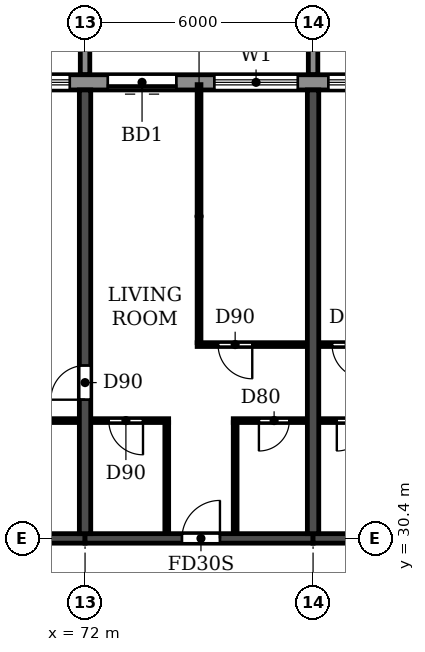
"""IFC4 building model, lengths in metres.
Left out: names, types, materials, properties, quantities, classifications, styles, units other than length and angle.
Written with IfcOpenShell. Run it as: python <this file> out.ifc"""

import sys

from ifc_helpers import new_model, si_unit, direction, frame, frame_2d, origin, place, context, subcontext, project, spatial, polyline, rectangle, outline, extrude, source, transform, mapped, element, fill, save


model = new_model("IFC4")
c1 = context("Model", 3, precision=1e-05, world=origin(), true_north=direction((0.0, 1.0)))
c2 = subcontext(c1, "Body", "Model", "MODEL_VIEW")
j1 = project(units=[si_unit("LENGTHUNIT", "METRE"), si_unit("PLANEANGLEUNIT", "RADIAN")], contexts=[c1])
p1 = place(None, origin())
s1 = spatial("IfcSite", under=j1, at=p1, CompositionType="ELEMENT")
p2 = place(p1, origin())
s2 = spatial("IfcBuilding", under=s1, at=p2, CompositionType="ELEMENT")
p3 = place(p2, frame((0.0, 0.0, 152.1)))
s3 = spatial("IfcBuildingStorey", under=s2, at=p3, CompositionType="ELEMENT", Elevation=152.1)
p4 = place(p3, frame((72.0, 30.525, 0.0), z_axis=(0.0, 0.0, 1.0), x_axis=(0.0, 1.0, 0.0)))
e1 = element("IfcWall", 1, at=p4, inside=s3, PredefinedType="SHEAR", context=c2, shape_type="SweptSolid", body=[
    extrude(rectangle(XDim=11.675, YDim=0.3, at=frame_2d((5.837, 0.0))), origin(), (0.0, 0.0, 1.0), 3.07),
])
p5 = place(p4, frame((3.525, 0.0, 0.0)))
e2 = element("IfcOpeningElement", 2, at=p5, cuts=e1, PredefinedType="OPENING", context=c2, shape_type="SweptSolid", body=[
    extrude(rectangle(XDim=0.9, YDim=2.1, at=frame_2d((0.45, 1.05))), frame((0.0, 0.16, 0.0), z_axis=(0.0, -1.0, 0.0), x_axis=(1.0, 0.0, 0.0)), (0.0, 0.0, 1.0), 0.32),
])
p6 = place(p3, frame((78.0, 30.525, 0.0), z_axis=(0.0, 0.0, 1.0), x_axis=(0.0, 1.0, 0.0)))
e3 = element("IfcWall", 3, at=p6, inside=s3, PredefinedType="SHEAR", context=c2, shape_type="SweptSolid", body=[
    extrude(rectangle(XDim=11.675, YDim=0.3, at=frame_2d((5.837, 0.0))), origin(), (0.0, 0.0, 1.0), 3.07),
])
p7 = place(p3, frame((66.0, 30.4, 0.0), z_axis=(0.0, 0.0, 1.0), x_axis=(1.0, 0.0, 0.0)))
e4 = element("IfcWall", 4, at=p7, inside=s3, PredefinedType="SHEAR", context=c2, shape_type="SweptSolid", body=[
    extrude(rectangle(XDim=6.0, YDim=0.25, at=frame_2d((3.0, 0.0))), origin(), (0.0, 0.0, 1.0), 2.47),
])
p8 = place(p3, frame((72.0, 30.4, 0.0), z_axis=(0.0, 0.0, 1.0), x_axis=(1.0, 0.0, 0.0)))
e5 = element("IfcWall", 5, at=p8, inside=s3, PredefinedType="SHEAR", context=c2, shape_type="SweptSolid", body=[
    extrude(rectangle(XDim=6.0, YDim=0.25, at=frame_2d((3.0, 0.0))), origin(), (0.0, 0.0, 1.0), 2.47),
])
p9 = place(p8, frame((2.55, 0.0, 0.0)))
e6 = element("IfcOpeningElement", 6, at=p9, cuts=e5, PredefinedType="OPENING", context=c2, shape_type="SweptSolid", body=[
    extrude(rectangle(XDim=1.0, YDim=2.1, at=frame_2d((0.5, 1.05))), frame((0.0, 0.135, 0.0), z_axis=(0.0, -1.0, 0.0), x_axis=(1.0, 0.0, 0.0)), (0.0, 0.0, 1.0), 0.27),
])
p10 = place(p3, frame((78.0, 30.4, 0.0), z_axis=(0.0, 0.0, 1.0), x_axis=(1.0, 0.0, 0.0)))
e7 = element("IfcWall", 7, at=p10, inside=s3, PredefinedType="SHEAR", context=c2, shape_type="SweptSolid", body=[
    extrude(rectangle(XDim=6.0, YDim=0.25, at=frame_2d((3.0, 0.0))), origin(), (0.0, 0.0, 1.0), 2.47),
])
p11 = place(p10, frame((2.45, 0.0, 0.0)))
e8 = element("IfcOpeningElement", 8, at=p11, cuts=e7, PredefinedType="OPENING", context=c2, shape_type="SweptSolid", body=[
    extrude(rectangle(XDim=1.0, YDim=2.1, at=frame_2d((0.5, 1.05))), frame((0.0, 0.135, 0.0), z_axis=(0.0, -1.0, 0.0), x_axis=(1.0, 0.0, 0.0)), (0.0, 0.0, 1.0), 0.27),
])
p12 = place(p3, frame((85.317, 42.4, 0.0), z_axis=(0.0, 0.0, 1.0), x_axis=(-1.0, 0.0, 0.0)))
e9 = element("IfcWall", 9, at=p12, inside=s3, PredefinedType="STANDARD", context=c2, shape_type="SweptSolid", body=[
    extrude(rectangle(XDim=68.634, YDim=0.4, at=frame_2d((34.317, 0.0))), origin(), (0.0, 0.0, 1.0), 3.07),
])
p13 = place(p12, frame((64.917, 0.0, 0.0)))
e10 = element("IfcOpeningElement", 10, at=p13, cuts=e9, PredefinedType="OPENING", context=c2, shape_type="SweptSolid", body=[
    extrude(rectangle(XDim=1.8, YDim=2.4, at=frame_2d((0.9, 1.2))), frame((0.0, 0.21, 0.0), z_axis=(0.0, -1.0, 0.0), x_axis=(1.0, 0.0, 0.0)), (0.0, 0.0, 1.0), 0.42),
])
p14 = place(p12, frame((61.717, 0.0, 0.9)))
e11 = element("IfcOpeningElement", 11, at=p14, cuts=e9, PredefinedType="OPENING", context=c2, shape_type="SweptSolid", body=[
    extrude(rectangle(XDim=2.2, YDim=1.5, at=frame_2d((1.1, 0.75))), frame((0.0, 0.21, 0.0), z_axis=(0.0, -1.0, 0.0), x_axis=(1.0, 0.0, 0.0)), (0.0, 0.0, 1.0), 0.42),
])
p15 = place(p12, frame((58.717, 0.0, 0.9)))
e12 = element("IfcOpeningElement", 12, at=p15, cuts=e9, PredefinedType="OPENING", context=c2, shape_type="SweptSolid", body=[
    extrude(rectangle(XDim=2.2, YDim=1.5, at=frame_2d((1.1, 0.75))), frame((0.0, 0.21, 0.0), z_axis=(0.0, -1.0, 0.0), x_axis=(1.0, 0.0, 0.0)), (0.0, 0.0, 1.0), 0.42),
])
p16 = place(p12, frame((55.917, 0.0, 0.0)))
e13 = element("IfcOpeningElement", 13, at=p16, cuts=e9, PredefinedType="OPENING", context=c2, shape_type="SweptSolid", body=[
    extrude(rectangle(XDim=1.8, YDim=2.4, at=frame_2d((0.9, 1.2))), frame((0.0, 0.21, 0.0), z_axis=(0.0, -1.0, 0.0), x_axis=(1.0, 0.0, 0.0)), (0.0, 0.0, 1.0), 0.42),
])
p17 = place(p12, frame((52.917, 0.0, 0.0)))
e14 = element("IfcOpeningElement", 14, at=p17, cuts=e9, PredefinedType="OPENING", context=c2, shape_type="SweptSolid", body=[
    extrude(rectangle(XDim=1.8, YDim=2.4, at=frame_2d((0.9, 1.2))), frame((0.0, 0.21, 0.0), z_axis=(0.0, -1.0, 0.0), x_axis=(1.0, 0.0, 0.0)), (0.0, 0.0, 1.0), 0.42),
])
p18 = place(p12, frame((49.717, 0.0, 0.9)))
e15 = element("IfcOpeningElement", 15, at=p18, cuts=e9, PredefinedType="OPENING", context=c2, shape_type="SweptSolid", body=[
    extrude(rectangle(XDim=2.2, YDim=1.5, at=frame_2d((1.1, 0.75))), frame((0.0, 0.21, 0.0), z_axis=(0.0, -1.0, 0.0), x_axis=(1.0, 0.0, 0.0)), (0.0, 0.0, 1.0), 0.42),
])
p19 = place(p12, frame((46.717, 0.0, 0.9)))
e16 = element("IfcOpeningElement", 16, at=p19, cuts=e9, PredefinedType="OPENING", context=c2, shape_type="SweptSolid", body=[
    extrude(rectangle(XDim=2.2, YDim=1.5, at=frame_2d((1.1, 0.75))), frame((0.0, 0.21, 0.0), z_axis=(0.0, -1.0, 0.0), x_axis=(1.0, 0.0, 0.0)), (0.0, 0.0, 1.0), 0.42),
])
p20 = place(p12, frame((43.717, 0.0, 0.9)))
e17 = element("IfcOpeningElement", 17, at=p20, cuts=e9, PredefinedType="OPENING", context=c2, shape_type="SweptSolid", body=[
    extrude(rectangle(XDim=2.2, YDim=1.5, at=frame_2d((1.1, 0.75))), frame((0.0, 0.21, 0.0), z_axis=(0.0, -1.0, 0.0), x_axis=(1.0, 0.0, 0.0)), (0.0, 0.0, 1.0), 0.42),
])
p21 = place(p12, frame((40.917, 0.0, 0.0)))
e18 = element("IfcOpeningElement", 18, at=p21, cuts=e9, PredefinedType="OPENING", context=c2, shape_type="SweptSolid", body=[
    extrude(rectangle(XDim=1.8, YDim=2.4, at=frame_2d((0.9, 1.2))), frame((0.0, 0.21, 0.0), z_axis=(0.0, -1.0, 0.0), x_axis=(1.0, 0.0, 0.0)), (0.0, 0.0, 1.0), 0.42),
])
p22 = place(p12, frame((37.717, 0.0, 0.9)))
e19 = element("IfcOpeningElement", 19, at=p22, cuts=e9, PredefinedType="OPENING", context=c2, shape_type="SweptSolid", body=[
    extrude(rectangle(XDim=2.2, YDim=1.5, at=frame_2d((1.1, 0.75))), frame((0.0, 0.21, 0.0), z_axis=(0.0, -1.0, 0.0), x_axis=(1.0, 0.0, 0.0)), (0.0, 0.0, 1.0), 0.42),
])
p23 = place(p12, frame((34.917, 0.0, 0.0)))
e20 = element("IfcOpeningElement", 20, at=p23, cuts=e9, PredefinedType="OPENING", context=c2, shape_type="SweptSolid", body=[
    extrude(rectangle(XDim=1.8, YDim=2.4, at=frame_2d((0.9, 1.2))), frame((0.0, 0.21, 0.0), z_axis=(0.0, -1.0, 0.0), x_axis=(1.0, 0.0, 0.0)), (0.0, 0.0, 1.0), 0.42),
])
p24 = place(p12, frame((31.717, 0.0, 0.9)))
e21 = element("IfcOpeningElement", 21, at=p24, cuts=e9, PredefinedType="OPENING", context=c2, shape_type="SweptSolid", body=[
    extrude(rectangle(XDim=2.2, YDim=1.5, at=frame_2d((1.1, 0.75))), frame((0.0, 0.21, 0.0), z_axis=(0.0, -1.0, 0.0), x_axis=(1.0, 0.0, 0.0)), (0.0, 0.0, 1.0), 0.42),
])
p25 = place(p12, frame((28.717, 0.0, 0.9)))
e22 = element("IfcOpeningElement", 22, at=p25, cuts=e9, PredefinedType="OPENING", context=c2, shape_type="SweptSolid", body=[
    extrude(rectangle(XDim=2.2, YDim=1.5, at=frame_2d((1.1, 0.75))), frame((0.0, 0.21, 0.0), z_axis=(0.0, -1.0, 0.0), x_axis=(1.0, 0.0, 0.0)), (0.0, 0.0, 1.0), 0.42),
])
p26 = place(p12, frame((25.717, 0.0, 0.9)))
e23 = element("IfcOpeningElement", 23, at=p26, cuts=e9, PredefinedType="OPENING", context=c2, shape_type="SweptSolid", body=[
    extrude(rectangle(XDim=2.2, YDim=1.5, at=frame_2d((1.1, 0.75))), frame((0.0, 0.21, 0.0), z_axis=(0.0, -1.0, 0.0), x_axis=(1.0, 0.0, 0.0)), (0.0, 0.0, 1.0), 0.42),
])
p27 = place(p12, frame((22.717, 0.0, 0.9)))
e24 = element("IfcOpeningElement", 24, at=p27, cuts=e9, PredefinedType="OPENING", context=c2, shape_type="SweptSolid", body=[
    extrude(rectangle(XDim=2.2, YDim=1.5, at=frame_2d((1.1, 0.75))), frame((0.0, 0.21, 0.0), z_axis=(0.0, -1.0, 0.0), x_axis=(1.0, 0.0, 0.0)), (0.0, 0.0, 1.0), 0.42),
])
p28 = place(p12, frame((19.917, 0.0, 0.0)))
e25 = element("IfcOpeningElement", 25, at=p28, cuts=e9, PredefinedType="OPENING", context=c2, shape_type="SweptSolid", body=[
    extrude(rectangle(XDim=1.8, YDim=2.4, at=frame_2d((0.9, 1.2))), frame((0.0, 0.21, 0.0), z_axis=(0.0, -1.0, 0.0), x_axis=(1.0, 0.0, 0.0)), (0.0, 0.0, 1.0), 0.42),
])
p29 = place(p12, frame((16.717, 0.0, 0.9)))
e26 = element("IfcOpeningElement", 26, at=p29, cuts=e9, PredefinedType="OPENING", context=c2, shape_type="SweptSolid", body=[
    extrude(rectangle(XDim=2.2, YDim=1.5, at=frame_2d((1.1, 0.75))), frame((0.0, 0.21, 0.0), z_axis=(0.0, -1.0, 0.0), x_axis=(1.0, 0.0, 0.0)), (0.0, 0.0, 1.0), 0.42),
])
p30 = place(p12, frame((13.717, 0.0, 0.9)))
e27 = element("IfcOpeningElement", 27, at=p30, cuts=e9, PredefinedType="OPENING", context=c2, shape_type="SweptSolid", body=[
    extrude(rectangle(XDim=2.2, YDim=1.5, at=frame_2d((1.1, 0.75))), frame((0.0, 0.21, 0.0), z_axis=(0.0, -1.0, 0.0), x_axis=(1.0, 0.0, 0.0)), (0.0, 0.0, 1.0), 0.42),
])
p31 = place(p12, frame((10.917, 0.0, 0.0)))
e28 = element("IfcOpeningElement", 28, at=p31, cuts=e9, PredefinedType="OPENING", context=c2, shape_type="SweptSolid", body=[
    extrude(rectangle(XDim=1.8, YDim=2.4, at=frame_2d((0.9, 1.2))), frame((0.0, 0.21, 0.0), z_axis=(0.0, -1.0, 0.0), x_axis=(1.0, 0.0, 0.0)), (0.0, 0.0, 1.0), 0.42),
])
p32 = place(p12, frame((7.717, 0.0, 0.9)))
e29 = element("IfcOpeningElement", 29, at=p32, cuts=e9, PredefinedType="OPENING", context=c2, shape_type="SweptSolid", body=[
    extrude(rectangle(XDim=2.2, YDim=1.5, at=frame_2d((1.1, 0.75))), frame((0.0, 0.21, 0.0), z_axis=(0.0, -1.0, 0.0), x_axis=(1.0, 0.0, 0.0)), (0.0, 0.0, 1.0), 0.42),
])
p33 = place(p12, frame((4.717, 0.0, 0.9)))
e30 = element("IfcOpeningElement", 30, at=p33, cuts=e9, PredefinedType="OPENING", context=c2, shape_type="SweptSolid", body=[
    extrude(rectangle(XDim=2.2, YDim=1.5, at=frame_2d((1.1, 0.75))), frame((0.0, 0.21, 0.0), z_axis=(0.0, -1.0, 0.0), x_axis=(1.0, 0.0, 0.0)), (0.0, 0.0, 1.0), 0.42),
])
p34 = place(p12, frame((1.917, 0.0, 0.0)))
e31 = element("IfcOpeningElement", 31, at=p34, cuts=e9, PredefinedType="OPENING", context=c2, shape_type="SweptSolid", body=[
    extrude(rectangle(XDim=1.8, YDim=2.4, at=frame_2d((0.9, 1.2))), frame((0.0, 0.21, 0.0), z_axis=(0.0, -1.0, 0.0), x_axis=(1.0, 0.0, 0.0)), (0.0, 0.0, 1.0), 0.42),
])
m1 = source(origin(), c2, "Body", "SweptSolid", [
    extrude(outline(polyline([(0.0, 0.0), (0.25, 0.0), (0.25, 3.1), (0.0, 3.1), (0.0, 0.0)])), origin(), (0.0, 0.0, 1.0), 3.1),
])
for number, where in (
    (32, (71.875, 42.6, 0.0)),
    (33, (77.875, 42.6, 0.0)),
):
    element("IfcWall", number, at=place(p3, frame(where)), inside=s3, PredefinedType="STANDARD", context=c2, shape_type="MappedRepresentation", body=[
        mapped(m1, transform((0.0, 0.0, 0.0))),
    ])
p35 = place(p3, frame((68.9, 33.5, 0.0), z_axis=(0.0, 0.0, 1.0), x_axis=(1.0, 0.0, 0.0)))
e34 = element("IfcWall", 34, at=p35, inside=s3, PredefinedType="PARTITIONING", context=c2, shape_type="SweptSolid", body=[
    extrude(rectangle(XDim=2.94, YDim=0.1, at=frame_2d((1.47, 0.0))), origin(), (0.0, 0.0, 1.0), 3.07),
])
p36 = place(p35, frame((1.2, 0.0, 0.0)))
e35 = element("IfcOpeningElement", 35, at=p36, cuts=e34, PredefinedType="OPENING", context=c2, shape_type="SweptSolid", body=[
    extrude(rectangle(XDim=0.8, YDim=2.1, at=frame_2d((0.4, 1.05))), frame((0.0, 0.06, 0.0), z_axis=(0.0, -1.0, 0.0), x_axis=(1.0, 0.0, 0.0)), (0.0, 0.0, 1.0), 0.12),
])
p37 = place(p3, frame((72.16, 33.5, 0.0), z_axis=(0.0, 0.0, 1.0), x_axis=(1.0, 0.0, 0.0)))
e36 = element("IfcWall", 36, at=p37, inside=s3, PredefinedType="PARTITIONING", context=c2, shape_type="SweptSolid", body=[
    extrude(rectangle(XDim=2.04, YDim=0.1, at=frame_2d((1.02, 0.0))), origin(), (0.0, 0.0, 1.0), 3.07),
])
p38 = place(p37, frame((0.465, 0.0, 0.0)))
e37 = element("IfcOpeningElement", 37, at=p38, cuts=e36, PredefinedType="OPENING", context=c2, shape_type="SweptSolid", body=[
    extrude(rectangle(XDim=0.9, YDim=2.1, at=frame_2d((0.45, 1.05))), frame((0.0, 0.06, 0.0), z_axis=(0.0, -1.0, 0.0), x_axis=(1.0, 0.0, 0.0)), (0.0, 0.0, 1.0), 0.12),
])
p39 = place(p3, frame((75.9, 33.5, 0.0), z_axis=(0.0, 0.0, 1.0), x_axis=(1.0, 0.0, 0.0)))
e38 = element("IfcWall", 38, at=p39, inside=s3, PredefinedType="PARTITIONING", context=c2, shape_type="SweptSolid", body=[
    extrude(rectangle(XDim=1.94, YDim=0.1, at=frame_2d((0.97, 0.0))), origin(), (0.0, 0.0, 1.0), 3.07),
])
p40 = place(p39, frame((0.675, 0.0, 0.0)))
e39 = element("IfcOpeningElement", 39, at=p40, cuts=e38, PredefinedType="OPENING", context=c2, shape_type="SweptSolid", body=[
    extrude(rectangle(XDim=0.8, YDim=2.1, at=frame_2d((0.4, 1.05))), frame((0.0, 0.06, 0.0), z_axis=(0.0, -1.0, 0.0), x_axis=(1.0, 0.0, 0.0)), (0.0, 0.0, 1.0), 0.12),
])
p41 = place(p3, frame((78.16, 33.5, 0.0), z_axis=(0.0, 0.0, 1.0), x_axis=(1.0, 0.0, 0.0)))
e40 = element("IfcWall", 40, at=p41, inside=s3, PredefinedType="PARTITIONING", context=c2, shape_type="SweptSolid", body=[
    extrude(rectangle(XDim=1.94, YDim=0.1, at=frame_2d((0.97, 0.0))), origin(), (0.0, 0.0, 1.0), 3.07),
])
p42 = place(p41, frame((0.465, 0.0, 0.0)))
e41 = element("IfcOpeningElement", 41, at=p42, cuts=e40, PredefinedType="OPENING", context=c2, shape_type="SweptSolid", body=[
    extrude(rectangle(XDim=0.8, YDim=2.1, at=frame_2d((0.4, 1.05))), frame((0.0, 0.06, 0.0), z_axis=(0.0, -1.0, 0.0), x_axis=(1.0, 0.0, 0.0)), (0.0, 0.0, 1.0), 0.12),
])
p43 = place(p3, frame((74.95, 35.5, 0.0), z_axis=(0.0, 0.0, 1.0), x_axis=(1.0, 0.0, 0.0)))
e42 = element("IfcWall", 42, at=p43, inside=s3, PredefinedType="PARTITIONING", context=c2, shape_type="SweptSolid", body=[
    extrude(rectangle(XDim=2.89, YDim=0.1, at=frame_2d((1.445, 0.0))), origin(), (0.0, 0.0, 1.0), 3.07),
])
p44 = place(p43, frame((0.55, 0.0, 0.0)))
e43 = element("IfcOpeningElement", 43, at=p44, cuts=e42, PredefinedType="OPENING", context=c2, shape_type="SweptSolid", body=[
    extrude(rectangle(XDim=0.9, YDim=2.1, at=frame_2d((0.45, 1.05))), frame((0.0, 0.06, 0.0), z_axis=(0.0, -1.0, 0.0), x_axis=(1.0, 0.0, 0.0)), (0.0, 0.0, 1.0), 0.12),
])
p45 = place(p3, frame((78.16, 35.5, 0.0), z_axis=(0.0, 0.0, 1.0), x_axis=(1.0, 0.0, 0.0)))
e44 = element("IfcWall", 44, at=p45, inside=s3, PredefinedType="PARTITIONING", context=c2, shape_type="SweptSolid", body=[
    extrude(rectangle(XDim=2.89, YDim=0.1, at=frame_2d((1.445, 0.0))), origin(), (0.0, 0.0, 1.0), 3.07),
])
p46 = place(p45, frame((0.34, 0.0, 0.0)))
e45 = element("IfcOpeningElement", 45, at=p46, cuts=e44, PredefinedType="OPENING", context=c2, shape_type="SweptSolid", body=[
    extrude(rectangle(XDim=0.9, YDim=2.1, at=frame_2d((0.45, 1.05))), frame((0.0, 0.06, 0.0), z_axis=(0.0, -1.0, 0.0), x_axis=(1.0, 0.0, 0.0)), (0.0, 0.0, 1.0), 0.12),
])
p47 = place(p3, frame((74.15, 30.535, 0.0), z_axis=(0.0, 0.0, 1.0), x_axis=(0.0, 1.0, 0.0)))
e46 = element("IfcWall", 46, at=p47, inside=s3, PredefinedType="PARTITIONING", context=c2, shape_type="SweptSolid", body=[
    extrude(rectangle(XDim=2.915, YDim=0.1, at=frame_2d((1.458, 0.0))), origin(), (0.0, 0.0, 1.0), 3.07),
])
p48 = place(p3, frame((75.0, 35.55, 0.0), z_axis=(0.0, 0.0, 1.0), x_axis=(0.0, 1.0, 0.0)))
e47 = element("IfcWall", 47, at=p48, inside=s3, PredefinedType="PARTITIONING", context=c2, shape_type="SweptSolid", body=[
    extrude(rectangle(XDim=6.79, YDim=0.1, at=frame_2d((3.395, 0.0))), origin(), (0.0, 0.0, 1.0), 3.07),
])
p49 = place(p3, frame((75.95, 30.535, 0.0), z_axis=(0.0, 0.0, 1.0), x_axis=(0.0, 1.0, 0.0)))
e48 = element("IfcWall", 48, at=p49, inside=s3, PredefinedType="PARTITIONING", context=c2, shape_type="SweptSolid", body=[
    extrude(rectangle(XDim=2.915, YDim=0.1, at=frame_2d((1.458, 0.0))), origin(), (0.0, 0.0, 1.0), 3.07),
])
p50 = place(p30, origin())
e49 = element("IfcWindow", 49, at=p50, inside=s3, PartitioningType="DOUBLE_PANEL_HORIZONTAL", PredefinedType="WINDOW", context=c2, shape_type="SweptSolid", body=[
    extrude(rectangle(XDim=2.2, YDim=1.5, at=frame_2d((1.1, 0.75))), frame((0.0, 0.03, 0.0), z_axis=(0.0, -1.0, 0.0), x_axis=(1.0, 0.0, 0.0)), (0.0, 0.0, 1.0), 0.06),
])
fill(e27, e49)
p51 = place(p31, origin())
e50 = element("IfcDoor", 50, at=p51, inside=s3, OperationType="DOUBLE_DOOR_SLIDING", PredefinedType="DOOR", context=c2, shape_type="SweptSolid", body=[
    extrude(rectangle(XDim=1.8, YDim=2.4, at=frame_2d((0.9, 1.2))), frame((0.0, 0.025, 0.0), z_axis=(0.0, -1.0, 0.0), x_axis=(1.0, 0.0, 0.0)), (0.0, 0.0, 1.0), 0.05),
])
fill(e28, e50)
p52 = place(p32, origin())
e51 = element("IfcWindow", 51, at=p52, inside=s3, PartitioningType="DOUBLE_PANEL_HORIZONTAL", PredefinedType="WINDOW", context=c2, shape_type="SweptSolid", body=[
    extrude(rectangle(XDim=2.2, YDim=1.5, at=frame_2d((1.1, 0.75))), frame((0.0, 0.03, 0.0), z_axis=(0.0, -1.0, 0.0), x_axis=(1.0, 0.0, 0.0)), (0.0, 0.0, 1.0), 0.06),
])
fill(e29, e51)
p53 = place(p33, origin())
e52 = element("IfcWindow", 52, at=p53, inside=s3, PartitioningType="DOUBLE_PANEL_HORIZONTAL", PredefinedType="WINDOW", context=c2, shape_type="SweptSolid", body=[
    extrude(rectangle(XDim=2.2, YDim=1.5, at=frame_2d((1.1, 0.75))), frame((0.0, 0.03, 0.0), z_axis=(0.0, -1.0, 0.0), x_axis=(1.0, 0.0, 0.0)), (0.0, 0.0, 1.0), 0.06),
])
fill(e30, e52)
p54 = place(p5, origin())
e53 = element("IfcDoor", 53, at=p54, inside=s3, OperationType="SINGLE_SWING_LEFT", PredefinedType="DOOR", context=c2, shape_type="SweptSolid", body=[
    extrude(rectangle(XDim=0.9, YDim=2.1, at=frame_2d((0.45, 1.05))), frame((0.0, 0.025, 0.0), z_axis=(0.0, -1.0, 0.0), x_axis=(1.0, 0.0, 0.0)), (0.0, 0.0, 1.0), 0.05),
])
fill(e2, e53)
p55 = place(p38, frame((0.9, 0.0, 0.0), z_axis=(0.0, 0.0, 1.0), x_axis=(-1.0, 0.0, 0.0)))
e54 = element("IfcDoor", 54, at=p55, inside=s3, OperationType="SINGLE_SWING_LEFT", PredefinedType="DOOR", context=c2, shape_type="SweptSolid", body=[
    extrude(rectangle(XDim=0.9, YDim=2.1, at=frame_2d((0.45, 1.05))), frame((0.0, 0.025, 0.0), z_axis=(0.0, -1.0, 0.0), x_axis=(1.0, 0.0, 0.0)), (0.0, 0.0, 1.0), 0.05),
])
fill(e37, e54)
p56 = place(p9, origin())
e55 = element("IfcDoor", 55, at=p56, inside=s3, OperationType="SINGLE_SWING_RIGHT", PredefinedType="DOOR", context=c2, shape_type="SweptSolid", body=[
    extrude(rectangle(XDim=1.0, YDim=2.1, at=frame_2d((0.5, 1.05))), frame((0.0, 0.025, 0.0), z_axis=(0.0, -1.0, 0.0), x_axis=(1.0, 0.0, 0.0)), (0.0, 0.0, 1.0), 0.05),
])
fill(e6, e55)
p57 = place(p44, frame((0.9, 0.0, 0.0), z_axis=(0.0, 0.0, 1.0), x_axis=(-1.0, 0.0, 0.0)))
e56 = element("IfcDoor", 56, at=p57, inside=s3, OperationType="SINGLE_SWING_LEFT", PredefinedType="DOOR", context=c2, shape_type="SweptSolid", body=[
    extrude(rectangle(XDim=0.9, YDim=2.1, at=frame_2d((0.45, 1.05))), frame((0.0, 0.025, 0.0), z_axis=(0.0, -1.0, 0.0), x_axis=(1.0, 0.0, 0.0)), (0.0, 0.0, 1.0), 0.05),
])
fill(e43, e56)
p58 = place(p40, frame((0.8, 0.0, 0.0), z_axis=(0.0, 0.0, 1.0), x_axis=(-1.0, 0.0, 0.0)))
e57 = element("IfcDoor", 57, at=p58, inside=s3, OperationType="SINGLE_SWING_RIGHT", PredefinedType="DOOR", context=c2, shape_type="SweptSolid", body=[
    extrude(rectangle(XDim=0.8, YDim=2.1, at=frame_2d((0.4, 1.05))), frame((0.0, 0.025, 0.0), z_axis=(0.0, -1.0, 0.0), x_axis=(1.0, 0.0, 0.0)), (0.0, 0.0, 1.0), 0.05),
])
fill(e39, e57)
p59 = place(p46, frame((0.9, 0.0, 0.0), z_axis=(0.0, 0.0, 1.0), x_axis=(-1.0, 0.0, 0.0)))
e58 = element("IfcDoor", 58, at=p59, inside=s3, OperationType="SINGLE_SWING_LEFT", PredefinedType="DOOR", context=c2, shape_type="SweptSolid", body=[
    extrude(rectangle(XDim=0.9, YDim=2.1, at=frame_2d((0.45, 1.05))), frame((0.0, 0.025, 0.0), z_axis=(0.0, -1.0, 0.0), x_axis=(1.0, 0.0, 0.0)), (0.0, 0.0, 1.0), 0.05),
])
fill(e45, e58)
p60 = place(p42, frame((0.8, 0.0, 0.0), z_axis=(0.0, 0.0, 1.0), x_axis=(-1.0, 0.0, 0.0)))
e59 = element("IfcDoor", 59, at=p60, inside=s3, OperationType="SINGLE_SWING_RIGHT", PredefinedType="DOOR", context=c2, shape_type="SweptSolid", body=[
    extrude(rectangle(XDim=0.8, YDim=2.1, at=frame_2d((0.4, 1.05))), frame((0.0, 0.025, 0.0), z_axis=(0.0, -1.0, 0.0), x_axis=(1.0, 0.0, 0.0)), (0.0, 0.0, 1.0), 0.05),
])
fill(e41, e59)
save(model, sys.argv[1])
